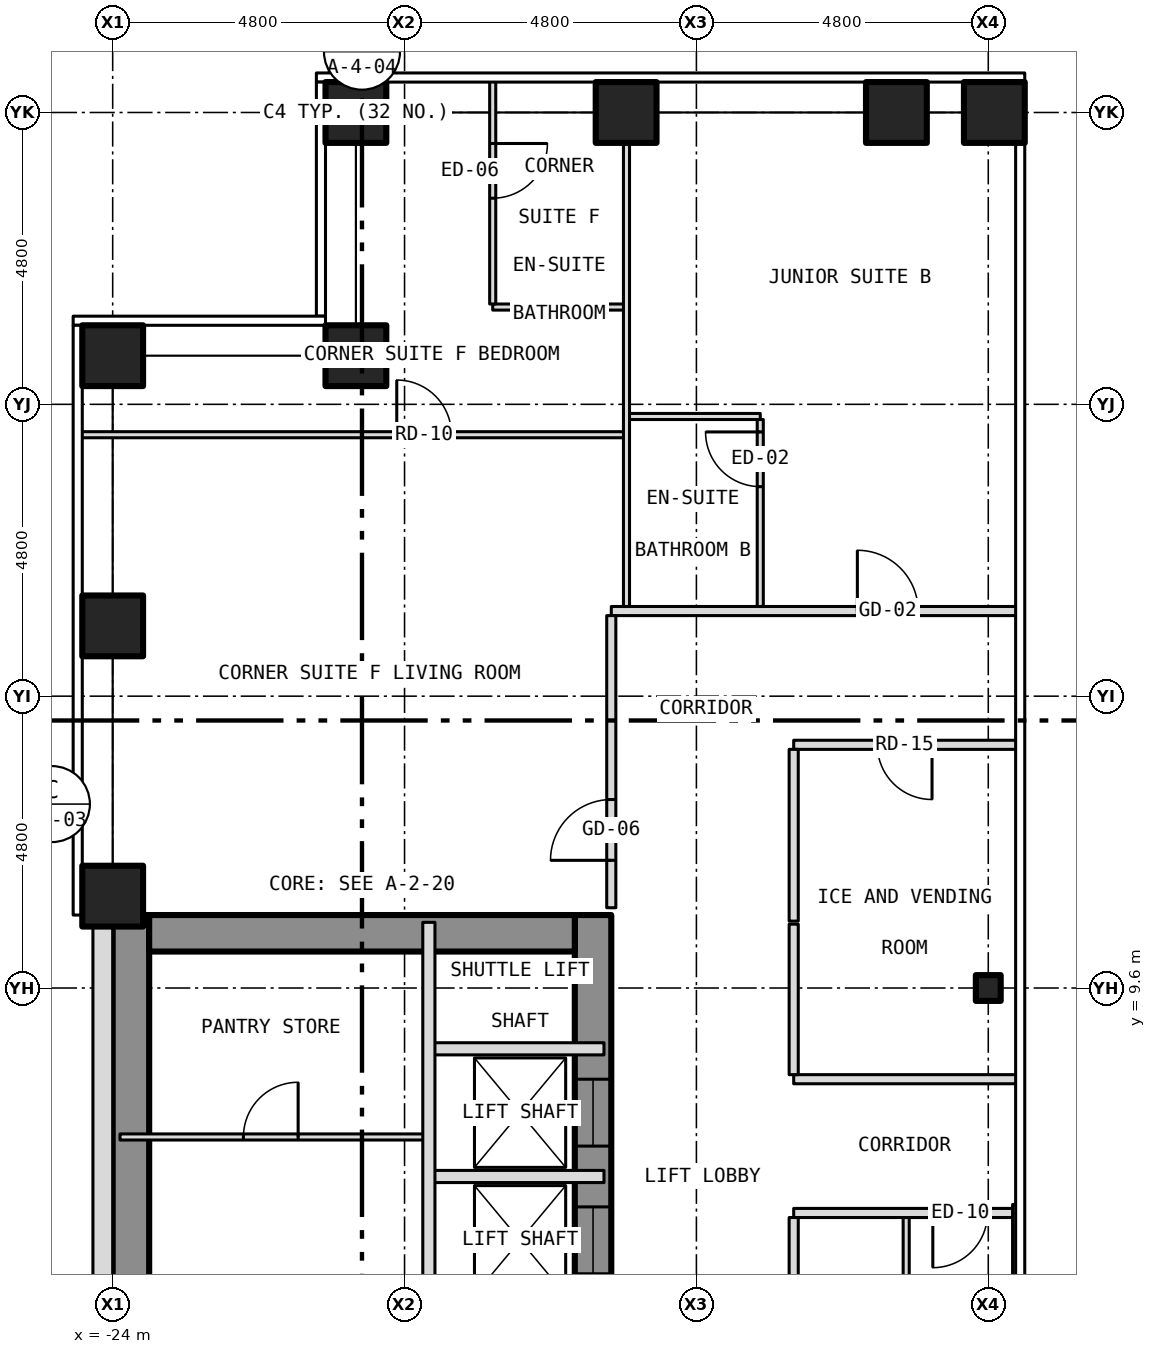
"""IFC4 building model, lengths in metres.
Left out: names, types, materials, properties, quantities, classifications, styles, units other than length and angle.
Written with IfcOpenShell. Run it as: python <this file> out.ifc"""

import sys

from ifc_helpers import new_model, si_unit, direction, frame, frame_2d, origin, origin_2d, place, context, subcontext, project, spatial, rectangle, hollow_rectangle, i_section, extrude, element, fill, save


model = new_model("IFC4")
c1 = context("Model", 3, precision=1e-05, world=origin(), true_north=direction((0.0, 1.0)))
c2 = subcontext(c1, "Body", "Model", "MODEL_VIEW")
j1 = project(units=[si_unit("LENGTHUNIT", "METRE"), si_unit("PLANEANGLEUNIT", "RADIAN")], contexts=[c1])
p1 = place(None, origin())
s1 = spatial("IfcSite", under=j1, at=p1, CompositionType="ELEMENT")
p2 = place(p1, origin())
s2 = spatial("IfcBuilding", under=s1, at=p2, CompositionType="ELEMENT")
p3 = place(p2, frame((0.0, 0.0, 74.0)))
s3 = spatial("IfcBuildingStorey", under=s2, at=p3, CompositionType="ELEMENT", Elevation=74.0)
for number, where, z_axis, x_axis in (
    (1, (-20.0, 24.0, -0.15), (0.0, 0.0, 1.0), (1.0, 0.0, 0.0)),
    (2, (-15.556, 24.0, -0.15), (0.0, 0.0, 1.0), (1.0, 0.0, 0.0)),
    (3, (-11.111, 24.0, -0.15), (0.0, 0.0, 1.0), (1.0, 0.0, 0.0)),
    (4, (-24.0, 11.111, -0.15), (0.0, 0.0, 1.0), (1.0, 0.0, 0.0)),
    (5, (-24.0, 15.556, -0.15), (0.0, 0.0, 1.0), (1.0, 0.0, 0.0)),
    (6, (-24.0, 20.0, -0.15), (0.0, 0.0, 1.0), (1.0, 0.0, 0.0)),
    (7, (-20.0, 20.0, -0.15), (0.0, 0.0, 1.0), (1.0, 0.0, 0.0)),
    (8, (-9.5, 24.0, -0.15), (0.0, 0.0, 1.0), (1.0, 0.0, 0.0)),
):
    element("IfcColumn", number, at=place(p3, frame(where, z_axis=z_axis, x_axis=x_axis)), inside=s3, PredefinedType="COLUMN", context=c2, shape_type="SweptSolid", body=[
        extrude(hollow_rectangle(XDim=1.0, YDim=1.0, WallThickness=0.06, at=origin_2d()), origin(), (0.0, 0.0, 1.0), 3.5),
    ])
p4 = place(p3, frame((-9.6, 9.6, -0.15), z_axis=(0.0, 0.0, 1.0), x_axis=(1.0, 0.0, 0.0)))
e9 = element("IfcColumn", 9, at=p4, inside=s3, PredefinedType="COLUMN", context=c2, shape_type="SweptSolid", body=[
    extrude(i_section(OverallWidth=0.409, OverallDepth=0.424, WebThickness=0.033, FlangeThickness=0.052, at=origin_2d()), origin(), (0.0, 0.0, 1.0), 3.5),
])
p5 = place(p3, frame((-16.1, -10.8, 0.0), z_axis=(0.0, 0.0, 1.0), x_axis=(0.0, 1.0, 0.0)))
e10 = element("IfcWall", 10, at=p5, inside=s3, PredefinedType="SHEAR", context=c2, shape_type="SweptSolid", body=[
    extrude(rectangle(XDim=21.6, YDim=0.6, at=frame_2d((10.8, 0.0))), origin(), (0.0, 0.0, 1.0), 3.25),
])
p6 = place(p5, frame((9.4, 0.0, 0.0)))
e11 = element("IfcOpeningElement", 11, at=p6, cuts=e10, PredefinedType="OPENING", context=c2, shape_type="SweptSolid", body=[
    extrude(rectangle(XDim=1.1, YDim=2.1, at=frame_2d((0.55, 1.05))), frame((0.0, 0.312, 0.0), z_axis=(0.0, -1.0, 0.0), x_axis=(1.0, 0.0, 0.0)), (0.0, 0.0, 1.0), 0.624),
])
p7 = place(p5, frame((11.5, 0.0, 0.0)))
e12 = element("IfcOpeningElement", 12, at=p7, cuts=e10, PredefinedType="OPENING", context=c2, shape_type="SweptSolid", body=[
    extrude(rectangle(XDim=1.1, YDim=2.1, at=frame_2d((0.55, 1.05))), frame((0.0, 0.312, 0.0), z_axis=(0.0, -1.0, 0.0), x_axis=(1.0, 0.0, 0.0)), (0.0, 0.0, 1.0), 0.624),
])
p8 = place(p5, frame((13.6, 0.0, 0.0)))
e13 = element("IfcOpeningElement", 13, at=p8, cuts=e10, PredefinedType="OPENING", context=c2, shape_type="SweptSolid", body=[
    extrude(rectangle(XDim=1.1, YDim=2.1, at=frame_2d((0.55, 1.05))), frame((0.0, 0.312, 0.0), z_axis=(0.0, -1.0, 0.0), x_axis=(1.0, 0.0, 0.0)), (0.0, 0.0, 1.0), 0.624),
])
p9 = place(p5, frame((15.7, 0.0, 0.0)))
e14 = element("IfcOpeningElement", 14, at=p9, cuts=e10, PredefinedType="OPENING", context=c2, shape_type="SweptSolid", body=[
    extrude(rectangle(XDim=1.1, YDim=2.1, at=frame_2d((0.55, 1.05))), frame((0.0, 0.312, 0.0), z_axis=(0.0, -1.0, 0.0), x_axis=(1.0, 0.0, 0.0)), (0.0, 0.0, 1.0), 0.624),
])
p10 = place(p5, frame((17.8, 0.0, 0.0)))
e15 = element("IfcOpeningElement", 15, at=p10, cuts=e10, PredefinedType="OPENING", context=c2, shape_type="SweptSolid", body=[
    extrude(rectangle(XDim=1.1, YDim=2.1, at=frame_2d((0.55, 1.05))), frame((0.0, 0.312, 0.0), z_axis=(0.0, -1.0, 0.0), x_axis=(1.0, 0.0, 0.0)), (0.0, 0.0, 1.0), 0.624),
])
p11 = place(p5, frame((0.758, 0.0, 0.0)))
e16 = element("IfcOpeningElement", 16, at=p11, cuts=e10, PredefinedType="OPENING", context=c2, shape_type="SweptSolid", body=[
    extrude(rectangle(XDim=1.1, YDim=2.1, at=frame_2d((0.55, 1.05))), frame((0.0, 0.312, 0.0), z_axis=(0.0, -1.0, 0.0), x_axis=(1.0, 0.0, 0.0)), (0.0, 0.0, 1.0), 0.624),
])
p12 = place(p5, frame((7.5, 0.0, 0.0)))
e17 = element("IfcOpeningElement", 17, at=p12, cuts=e10, PredefinedType="OPENING", context=c2, shape_type="SweptSolid", body=[
    extrude(rectangle(XDim=1.1, YDim=2.1, at=frame_2d((0.55, 1.05))), frame((0.0, 0.312, 0.0), z_axis=(0.0, -1.0, 0.0), x_axis=(1.0, 0.0, 0.0)), (0.0, 0.0, 1.0), 0.624),
])
p13 = place(p3, frame((-23.7, -10.8, 0.0), z_axis=(0.0, 0.0, 1.0), x_axis=(0.0, 1.0, 0.0)))
e18 = element("IfcWall", 18, at=p13, inside=s3, PredefinedType="SHEAR", context=c2, shape_type="SweptSolid", body=[
    extrude(rectangle(XDim=21.6, YDim=0.6, at=frame_2d((10.8, 0.0))), origin(), (0.0, 0.0, 1.0), 3.25),
])
p14 = place(p3, frame((-23.4, 10.5, 0.0), z_axis=(0.0, 0.0, 1.0), x_axis=(1.0, 0.0, 0.0)))
e19 = element("IfcWall", 19, at=p14, inside=s3, PredefinedType="SHEAR", context=c2, shape_type="SweptSolid", body=[
    extrude(rectangle(XDim=7.0, YDim=0.6, at=frame_2d((3.5, 0.0))), origin(), (0.0, 0.0, 1.0), 3.25),
])
p15 = place(p3, frame((-24.163, 10.8, 0.0), z_axis=(0.0, 0.0, 1.0), x_axis=(0.0, -1.0, 0.0)))
e20 = element("IfcWall", 20, at=p15, inside=s3, PredefinedType="SOLIDWALL", context=c2, shape_type="SweptSolid", body=[
    extrude(rectangle(XDim=21.6, YDim=0.325, at=frame_2d((10.8, 0.0))), origin(), (0.0, 0.0, 1.0), 3.5),
])
p16 = place(p15, frame((18.05, 0.0, 1.0)))
e21 = element("IfcOpeningElement", 21, at=p16, cuts=e20, PredefinedType="OPENING", context=c2, shape_type="SweptSolid", body=[
    extrude(rectangle(XDim=0.6, YDim=1.5, at=frame_2d((0.3, 0.75))), frame((0.0, 0.175, 0.0), z_axis=(0.0, -1.0, 0.0), x_axis=(1.0, 0.0, 0.0)), (0.0, 0.0, 1.0), 0.349),
])
p17 = place(p3, frame((-12.8, 5.9, 0.0), z_axis=(0.0, 0.0, 1.0), x_axis=(1.0, 0.0, 0.0)))
e22 = element("IfcWall", 22, at=p17, inside=s3, PredefinedType="PARTITIONING", context=c2, shape_type="SweptSolid", body=[
    extrude(rectangle(XDim=3.65, YDim=0.15, at=frame_2d((1.825, 0.0))), origin(), (0.0, 0.0, 1.0), 3.35),
])
p18 = place(p17, frame((2.288, 0.0, 0.0)))
e23 = element("IfcOpeningElement", 23, at=p18, cuts=e22, PredefinedType="OPENING", context=c2, shape_type="SweptSolid", body=[
    extrude(rectangle(XDim=0.9, YDim=2.1, at=frame_2d((0.45, 1.05))), frame((0.0, 0.087, 0.0), z_axis=(0.0, -1.0, 0.0), x_axis=(1.0, 0.0, 0.0)), (0.0, 0.0, 1.0), 0.174),
])
p19 = place(p3, frame((-18.8, 6.5, 0.0), z_axis=(0.0, 0.0, 1.0), x_axis=(1.0, 0.0, 0.0)))
e24 = element("IfcWall", 24, at=p19, inside=s3, PredefinedType="PARTITIONING", context=c2, shape_type="SweptSolid", body=[
    extrude(rectangle(XDim=2.88, YDim=0.2, at=frame_2d((1.44, 0.0))), origin(), (0.0, 0.0, 1.0), 3.25),
])
p20 = place(p3, frame((-23.88, 7.15, 0.0), z_axis=(0.0, 0.0, 1.0), x_axis=(1.0, 0.0, 0.0)))
e25 = element("IfcWall", 25, at=p20, inside=s3, PredefinedType="PARTITIONING", context=c2, shape_type="SweptSolid", body=[
    extrude(rectangle(XDim=5.08, YDim=0.1, at=frame_2d((2.54, 0.0))), origin(), (0.0, 0.0, 1.0), 3.25),
])
p21 = place(p20, frame((2.03, 0.0, 0.0)))
e26 = element("IfcOpeningElement", 26, at=p21, cuts=e25, PredefinedType="OPENING", context=c2, shape_type="SweptSolid", body=[
    extrude(rectangle(XDim=0.9, YDim=2.1, at=frame_2d((0.45, 1.05))), frame((0.0, 0.062, 0.0), z_axis=(0.0, -1.0, 0.0), x_axis=(1.0, 0.0, 0.0)), (0.0, 0.0, 1.0), 0.124),
])
p22 = place(p3, frame((-12.8, 8.1, 0.0), z_axis=(0.0, 0.0, 1.0), x_axis=(1.0, 0.0, 0.0)))
e27 = element("IfcWall", 27, at=p22, inside=s3, PredefinedType="PARTITIONING", context=c2, shape_type="SweptSolid", body=[
    extrude(rectangle(XDim=3.68, YDim=0.15, at=frame_2d((1.84, 0.0))), origin(), (0.0, 0.0, 1.0), 3.35),
])
p23 = place(p3, frame((-18.8, 8.6, 0.0), z_axis=(0.0, 0.0, 1.0), x_axis=(1.0, 0.0, 0.0)))
e28 = element("IfcWall", 28, at=p23, inside=s3, PredefinedType="PARTITIONING", context=c2, shape_type="SweptSolid", body=[
    extrude(rectangle(XDim=2.88, YDim=0.2, at=frame_2d((1.44, 0.0))), origin(), (0.0, 0.0, 1.0), 3.25),
])
p24 = place(p3, frame((-12.8, 13.6, 0.0), z_axis=(0.0, 0.0, 1.0), x_axis=(1.0, 0.0, 0.0)))
e29 = element("IfcWall", 29, at=p24, inside=s3, PredefinedType="PARTITIONING", context=c2, shape_type="SweptSolid", body=[
    extrude(rectangle(XDim=3.68, YDim=0.15, at=frame_2d((1.84, 0.0))), origin(), (0.0, 0.0, 1.0), 3.35),
])
p25 = place(p24, frame((1.375, 0.0, 0.0)))
e30 = element("IfcOpeningElement", 30, at=p25, cuts=e29, PredefinedType="OPENING", context=c2, shape_type="SweptSolid", body=[
    extrude(rectangle(XDim=0.9, YDim=2.1, at=frame_2d((0.45, 1.05))), frame((0.0, 0.087, 0.0), z_axis=(0.0, -1.0, 0.0), x_axis=(1.0, 0.0, 0.0)), (0.0, 0.0, 1.0), 0.174),
])
p26 = place(p3, frame((-15.8, 15.8, 0.0), z_axis=(0.0, 0.0, 1.0), x_axis=(1.0, 0.0, 0.0)))
e31 = element("IfcWall", 31, at=p26, inside=s3, PredefinedType="PARTITIONING", context=c2, shape_type="SweptSolid", body=[
    extrude(rectangle(XDim=6.68, YDim=0.15, at=frame_2d((3.34, 0.0))), origin(), (0.0, 0.0, 1.0), 3.35),
])
p27 = place(p26, frame((4.047, 0.0, 0.0)))
e32 = element("IfcOpeningElement", 32, at=p27, cuts=e31, PredefinedType="OPENING", context=c2, shape_type="SweptSolid", body=[
    extrude(rectangle(XDim=1.0, YDim=2.1, at=frame_2d((0.5, 1.05))), frame((0.0, 0.087, 0.0), z_axis=(0.0, -1.0, 0.0), x_axis=(1.0, 0.0, 0.0)), (0.0, 0.0, 1.0), 0.174),
])
p28 = place(p3, frame((-24.53, 18.7, 0.0), z_axis=(0.0, 0.0, 1.0), x_axis=(1.0, 0.0, 0.0)))
e33 = element("IfcWall", 33, at=p28, inside=s3, PredefinedType="PARTITIONING", context=c2, shape_type="SweptSolid", body=[
    extrude(rectangle(XDim=8.98, YDim=0.1, at=frame_2d((4.49, 0.0))), origin(), (0.0, 0.0, 1.0), 3.35),
])
p29 = place(p28, frame((5.202, 0.0, 0.0)))
e34 = element("IfcOpeningElement", 34, at=p29, cuts=e33, PredefinedType="OPENING", context=c2, shape_type="SweptSolid", body=[
    extrude(rectangle(XDim=0.9, YDim=2.1, at=frame_2d((0.45, 1.05))), frame((0.0, 0.062, 0.0), z_axis=(0.0, -1.0, 0.0), x_axis=(1.0, 0.0, 0.0)), (0.0, 0.0, 1.0), 0.124),
])
for number, where, z_axis, x_axis in (
    (35, (-15.55, 19.0, 0.0), (0.0, 0.0, 1.0), (1.0, 0.0, 0.0)),
    (36, (-17.75, 20.8, 0.0), (0.0, 0.0, 1.0), (1.0, 0.0, 0.0)),
):
    element("IfcWall", number, at=place(p3, frame(where, z_axis=z_axis, x_axis=x_axis)), inside=s3, PredefinedType="PARTITIONING", context=c2, shape_type="SweptSolid", body=[
        extrude(rectangle(XDim=2.2, YDim=0.1, at=frame_2d((1.1, 0.0))), origin(), (0.0, 0.0, 1.0), 3.35),
    ])
p30 = place(p3, frame((-18.8, -1.8, 0.0), z_axis=(0.0, 0.0, 1.0), x_axis=(0.0, 1.0, 0.0)))
e37 = element("IfcWall", 37, at=p30, inside=s3, PredefinedType="PARTITIONING", context=c2, shape_type="SweptSolid", body=[
    extrude(rectangle(XDim=12.48, YDim=0.2, at=frame_2d((6.24, 0.0))), origin(), (0.0, 0.0, 1.0), 3.25),
])
p31 = place(p3, frame((-17.75, 20.85, 0.0), z_axis=(0.0, 0.0, 1.0), x_axis=(0.0, 1.0, 0.0)))
e38 = element("IfcWall", 38, at=p31, inside=s3, PredefinedType="PARTITIONING", context=c2, shape_type="SweptSolid", body=[
    extrude(rectangle(XDim=3.68, YDim=0.1, at=frame_2d((1.84, 0.0))), origin(), (0.0, 0.0, 1.0), 3.35),
])
p32 = place(p31, frame((1.74, 0.0, 0.0)))
e39 = element("IfcOpeningElement", 39, at=p32, cuts=e38, PredefinedType="OPENING", context=c2, shape_type="SweptSolid", body=[
    extrude(rectangle(XDim=0.9, YDim=2.1, at=frame_2d((0.45, 1.05))), frame((0.0, 0.062, 0.0), z_axis=(0.0, -1.0, 0.0), x_axis=(1.0, 0.0, 0.0)), (0.0, 0.0, 1.0), 0.124),
])
p33 = place(p3, frame((-15.8, 10.92, 0.0), z_axis=(0.0, 0.0, 1.0), x_axis=(0.0, 1.0, 0.0)))
e40 = element("IfcWall", 40, at=p33, inside=s3, PredefinedType="PARTITIONING", context=c2, shape_type="SweptSolid", body=[
    extrude(rectangle(XDim=4.805, YDim=0.15, at=frame_2d((2.403, 0.0))), origin(), (0.0, 0.0, 1.0), 3.35),
])
p34 = place(p33, frame((0.78, 0.0, 0.0)))
e41 = element("IfcOpeningElement", 41, at=p34, cuts=e40, PredefinedType="OPENING", context=c2, shape_type="SweptSolid", body=[
    extrude(rectangle(XDim=1.0, YDim=2.1, at=frame_2d((0.5, 1.05))), frame((0.0, 0.087, 0.0), z_axis=(0.0, -1.0, 0.0), x_axis=(1.0, 0.0, 0.0)), (0.0, 0.0, 1.0), 0.174),
])
p35 = place(p3, frame((-15.55, 15.875, 0.0), z_axis=(0.0, 0.0, 1.0), x_axis=(0.0, 1.0, 0.0)))
e42 = element("IfcWall", 42, at=p35, inside=s3, PredefinedType="PARTITIONING", context=c2, shape_type="SweptSolid", body=[
    extrude(rectangle(XDim=8.005, YDim=0.1, at=frame_2d((4.002, 0.0))), origin(), (0.0, 0.0, 1.0), 3.35),
])
p36 = place(p3, frame((-13.35, 15.875, 0.0), z_axis=(0.0, 0.0, 1.0), x_axis=(0.0, 1.0, 0.0)))
e43 = element("IfcWall", 43, at=p36, inside=s3, PredefinedType="PARTITIONING", context=c2, shape_type="SweptSolid", body=[
    extrude(rectangle(XDim=3.075, YDim=0.1, at=frame_2d((1.538, 0.0))), origin(), (0.0, 0.0, 1.0), 3.35),
])
p37 = place(p36, frame((1.971, 0.0, 0.0)))
e44 = element("IfcOpeningElement", 44, at=p37, cuts=e43, PredefinedType="OPENING", context=c2, shape_type="SweptSolid", body=[
    extrude(rectangle(XDim=0.9, YDim=2.1, at=frame_2d((0.45, 1.05))), frame((0.0, 0.062, 0.0), z_axis=(0.0, -1.0, 0.0), x_axis=(1.0, 0.0, 0.0)), (0.0, 0.0, 1.0), 0.124),
])
p38 = place(p3, frame((-12.8, 2.4, 0.0), z_axis=(0.0, 0.0, 1.0), x_axis=(0.0, 1.0, 0.0)))
e45 = element("IfcWall", 45, at=p38, inside=s3, PredefinedType="PARTITIONING", context=c2, shape_type="SweptSolid", body=[
    extrude(rectangle(XDim=3.425, YDim=0.15, at=frame_2d((1.712, 0.0))), origin(), (0.0, 0.0, 1.0), 3.35),
])
p39 = place(p38, frame((1.25, 0.0, 0.0)))
e46 = element("IfcOpeningElement", 46, at=p39, cuts=e45, PredefinedType="OPENING", context=c2, shape_type="SweptSolid", body=[
    extrude(rectangle(XDim=0.9, YDim=2.1, at=frame_2d((0.45, 1.05))), frame((0.0, 0.087, 0.0), z_axis=(0.0, -1.0, 0.0), x_axis=(1.0, 0.0, 0.0)), (0.0, 0.0, 1.0), 0.174),
])
p40 = place(p3, frame((-12.8, 8.175, 0.0), z_axis=(0.0, 0.0, 1.0), x_axis=(0.0, 1.0, 0.0)))
e47 = element("IfcWall", 47, at=p40, inside=s3, PredefinedType="PARTITIONING", context=c2, shape_type="SweptSolid", body=[
    extrude(rectangle(XDim=2.475, YDim=0.15, at=frame_2d((1.237, 0.0))), origin(), (0.0, 0.0, 1.0), 3.35),
])
p41 = place(p3, frame((-12.8, 10.7, 0.0), z_axis=(0.0, 0.0, 1.0), x_axis=(0.0, 1.0, 0.0)))
e48 = element("IfcWall", 48, at=p41, inside=s3, PredefinedType="PARTITIONING", context=c2, shape_type="SweptSolid", body=[
    extrude(rectangle(XDim=2.825, YDim=0.15, at=frame_2d((1.413, 0.0))), origin(), (0.0, 0.0, 1.0), 3.35),
])
p42 = place(p3, frame((-10.95, 1.875, 0.0), z_axis=(0.0, 0.0, 1.0), x_axis=(0.0, 1.0, 0.0)))
e49 = element("IfcWall", 49, at=p42, inside=s3, PredefinedType="PARTITIONING", context=c2, shape_type="SweptSolid", body=[
    extrude(rectangle(XDim=3.95, YDim=0.1, at=frame_2d((1.975, 0.0))), origin(), (0.0, 0.0, 1.0), 3.35),
])
p43 = place(p3, frame((-9.15, 1.66, 0.0), z_axis=(0.0, 0.0, 1.0), x_axis=(0.0, 1.0, 0.0)))
e50 = element("IfcWall", 50, at=p43, inside=s3, PredefinedType="PARTITIONING", context=c2, shape_type="SweptSolid", body=[
    extrude(rectangle(XDim=4.38, YDim=0.1, at=frame_2d((2.19, 0.0))), origin(), (0.0, 0.0, 1.0), 2.733),
])
p44 = place(p9, origin())
e51 = element("IfcDoor", 51, at=p44, inside=s3, OperationType="SLIDING_TO_LEFT", PredefinedType="DOOR", context=c2, shape_type="SweptSolid", body=[
    extrude(rectangle(XDim=1.1, YDim=2.1, at=frame_2d((0.55, 1.05))), frame((0.0, 0.025, 0.0), z_axis=(0.0, -1.0, 0.0), x_axis=(1.0, 0.0, 0.0)), (0.0, 0.0, 1.0), 0.05),
])
fill(e14, e51)
p45 = place(p10, origin())
e52 = element("IfcDoor", 52, at=p45, inside=s3, OperationType="SLIDING_TO_LEFT", PredefinedType="DOOR", context=c2, shape_type="SweptSolid", body=[
    extrude(rectangle(XDim=1.1, YDim=2.1, at=frame_2d((0.55, 1.05))), frame((0.0, 0.025, 0.0), z_axis=(0.0, -1.0, 0.0), x_axis=(1.0, 0.0, 0.0)), (0.0, 0.0, 1.0), 0.05),
])
fill(e15, e52)
p46 = place(p21, origin())
e53 = element("IfcDoor", 53, at=p46, inside=s3, OperationType="SINGLE_SWING_RIGHT", PredefinedType="DOOR", context=c2, shape_type="SweptSolid", body=[
    extrude(rectangle(XDim=0.9, YDim=2.1, at=frame_2d((0.45, 1.05))), frame((0.0, 0.025, 0.0), z_axis=(0.0, -1.0, 0.0), x_axis=(1.0, 0.0, 0.0)), (0.0, 0.0, 1.0), 0.05),
])
fill(e26, e53)
p47 = place(p27, origin())
e54 = element("IfcDoor", 54, at=p47, inside=s3, OperationType="SINGLE_SWING_LEFT", PredefinedType="DOOR", context=c2, shape_type="SweptSolid", body=[
    extrude(rectangle(XDim=1.0, YDim=2.1, at=frame_2d((0.5, 1.05))), frame((0.0, 0.025, 0.0), z_axis=(0.0, -1.0, 0.0), x_axis=(1.0, 0.0, 0.0)), (0.0, 0.0, 1.0), 0.05),
])
fill(e32, e54)
p48 = place(p37, origin())
e55 = element("IfcDoor", 55, at=p48, inside=s3, OperationType="SINGLE_SWING_RIGHT", PredefinedType="DOOR", context=c2, shape_type="SweptSolid", body=[
    extrude(rectangle(XDim=0.9, YDim=2.1, at=frame_2d((0.45, 1.05))), frame((0.0, 0.025, 0.0), z_axis=(0.0, -1.0, 0.0), x_axis=(1.0, 0.0, 0.0)), (0.0, 0.0, 1.0), 0.05),
])
fill(e44, e55)
p49 = place(p34, origin())
e56 = element("IfcDoor", 56, at=p49, inside=s3, OperationType="SINGLE_SWING_LEFT", PredefinedType="DOOR", context=c2, shape_type="SweptSolid", body=[
    extrude(rectangle(XDim=1.0, YDim=2.1, at=frame_2d((0.5, 1.05))), frame((0.0, 0.025, 0.0), z_axis=(0.0, -1.0, 0.0), x_axis=(1.0, 0.0, 0.0)), (0.0, 0.0, 1.0), 0.05),
])
fill(e41, e56)
p50 = place(p29, origin())
e57 = element("IfcDoor", 57, at=p50, inside=s3, OperationType="SINGLE_SWING_LEFT", PredefinedType="DOOR", context=c2, shape_type="SweptSolid", body=[
    extrude(rectangle(XDim=0.9, YDim=2.1, at=frame_2d((0.45, 1.05))), frame((0.0, 0.025, 0.0), z_axis=(0.0, -1.0, 0.0), x_axis=(1.0, 0.0, 0.0)), (0.0, 0.0, 1.0), 0.05),
])
fill(e34, e57)
p51 = place(p32, origin())
e58 = element("IfcDoor", 58, at=p51, inside=s3, OperationType="SINGLE_SWING_RIGHT", PredefinedType="DOOR", context=c2, shape_type="SweptSolid", body=[
    extrude(rectangle(XDim=0.9, YDim=2.1, at=frame_2d((0.45, 1.05))), frame((0.0, 0.025, 0.0), z_axis=(0.0, -1.0, 0.0), x_axis=(1.0, 0.0, 0.0)), (0.0, 0.0, 1.0), 0.05),
])
fill(e39, e58)
p52 = place(p18, origin())
e59 = element("IfcDoor", 59, at=p52, inside=s3, OperationType="SINGLE_SWING_LEFT", PredefinedType="DOOR", context=c2, shape_type="SweptSolid", body=[
    extrude(rectangle(XDim=0.9, YDim=2.1, at=frame_2d((0.45, 1.05))), frame((0.0, 0.025, 0.0), z_axis=(0.0, -1.0, 0.0), x_axis=(1.0, 0.0, 0.0)), (0.0, 0.0, 1.0), 0.05),
])
fill(e23, e59)
p53 = place(p25, origin())
e60 = element("IfcDoor", 60, at=p53, inside=s3, OperationType="SINGLE_SWING_RIGHT", PredefinedType="DOOR", context=c2, shape_type="SweptSolid", body=[
    extrude(rectangle(XDim=0.9, YDim=2.1, at=frame_2d((0.45, 1.05))), frame((0.0, 0.025, 0.0), z_axis=(0.0, -1.0, 0.0), x_axis=(1.0, 0.0, 0.0)), (0.0, 0.0, 1.0), 0.05),
])
fill(e30, e60)
save(model, sys.argv[1])
